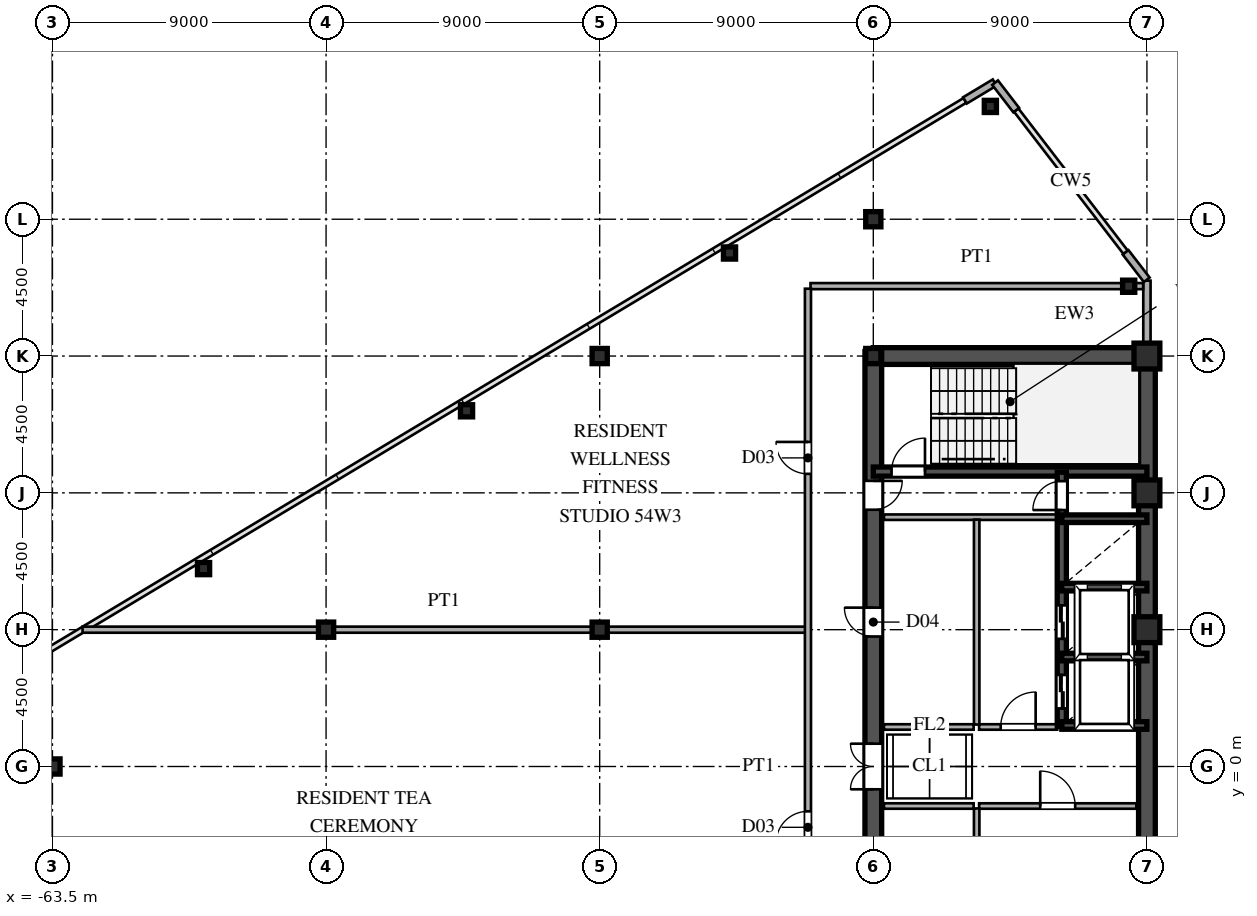
"""IFC4 building model, lengths in metres.
Left out: names, types, materials, properties, quantities, classifications, styles, units other than length and angle.
Written with IfcOpenShell. Run it as: python <this file> out.ifc"""

import sys

from ifc_helpers import new_model, si_unit, direction, frame, frame_2d, origin, origin_2d, place, context, subcontext, project, spatial, rectangle, hollow_rectangle, i_section, extrude, source, transform, mapped, element, fill, save


model = new_model("IFC4")
c1 = context("Model", 3, precision=1e-05, world=origin(), true_north=direction((0.0, 1.0)))
c2 = subcontext(c1, "Body", "Model", "MODEL_VIEW")
j1 = project(units=[si_unit("LENGTHUNIT", "METRE"), si_unit("PLANEANGLEUNIT", "RADIAN")], contexts=[c1])
p1 = place(None, origin())
s1 = spatial("IfcSite", under=j1, at=p1, CompositionType="ELEMENT")
p2 = place(p1, origin())
s2 = spatial("IfcBuilding", under=s1, at=p2, CompositionType="ELEMENT")
p3 = place(p2, frame((0.0, 0.0, 203.1)))
s3 = spatial("IfcBuildingStorey", under=s2, at=p3, CompositionType="ELEMENT", Elevation=203.1)
m1 = source(origin(), c2, "Body", "SweptSolid", [
    extrude(hollow_rectangle(XDim=0.85, YDim=0.85, WallThickness=0.036, at=origin_2d()), origin(), (0.0, 0.0, 1.0), 3.6),
])
for number, where, z_axis, x_axis in (
    (1, (-27.5, 4.5, 0.0), (0.0, 0.0, 1.0), (1.0, 0.0, 0.0)),
    (2, (-27.5, 9.0, 0.0), (0.0, 0.0, 1.0), (1.0, 0.0, 0.0)),
    (3, (-27.5, 13.5, 0.0), (0.0, 0.0, 1.0), (1.0, 0.0, 0.0)),
):
    element("IfcColumn", number, at=place(p3, frame(where, z_axis=z_axis, x_axis=x_axis)), inside=s3, PredefinedType="COLUMN", context=c2, shape_type="MappedRepresentation", body=[
        mapped(m1, transform((0.0, 0.0, 0.0), scale=1.0)),
    ])
m2 = source(origin(), c2, "Body", "SweptSolid", [
    extrude(i_section(OverallWidth=0.5, OverallDepth=0.5, WebThickness=0.02, FlangeThickness=0.032, at=origin_2d()), origin(), (0.0, 0.0, 1.0), 3.6),
])
for number, where, z_axis, x_axis in (
    (4, (-36.5, 13.5, 0.0), (0.0, 0.0, 1.0), (1.0, 0.0, 0.0)),
    (5, (-36.5, 18.0, 0.0), (0.0, 0.0, 1.0), (1.0, 0.0, 0.0)),
    (6, (-45.5, 4.5, 0.0), (0.0, 0.0, 1.0), (1.0, 0.0, 0.0)),
    (7, (-45.5, 13.5, 0.0), (0.0, 0.0, 1.0), (1.0, 0.0, 0.0)),
    (8, (-54.5, 4.5, 0.0), (0.0, 0.0, 1.0), (1.0, 0.0, 0.0)),
    (9, (-63.5, 0.0, 0.0), (0.0, 0.0, 1.0), (1.0, 0.0, 0.0)),
):
    element("IfcColumn", number, at=place(p3, frame(where, z_axis=z_axis, x_axis=x_axis)), inside=s3, PredefinedType="COLUMN", context=c2, shape_type="MappedRepresentation", body=[
        mapped(m2, transform((0.0, 0.0, 0.0), scale=1.0)),
    ])
m3 = source(origin(), c2, "Body", "SweptSolid", [
    extrude(hollow_rectangle(XDim=0.4, YDim=0.4, WallThickness=0.016, at=origin_2d()), origin(), (0.0, 0.0, 1.0), 3.6),
])
for number, where, z_axis, x_axis in (
    (10, (-28.1, 15.796, 0.0), (0.0, 0.0, 1.0), (1.0, 0.0, 0.0)),
    (11, (-32.65, 21.71, 0.0), (0.0, 0.0, 1.0), (1.0, 0.0, 0.0)),
    (12, (-41.23, 16.889, 0.0), (0.0, 0.0, 1.0), (1.0, 0.0, 0.0)),
    (13, (-49.88, 11.699, 0.0), (0.0, 0.0, 1.0), (1.0, 0.0, 0.0)),
    (14, (-58.53, 6.509, 0.0), (0.0, 0.0, 1.0), (1.0, 0.0, 0.0)),
):
    element("IfcColumn", number, at=place(p3, frame(where, z_axis=z_axis, x_axis=x_axis)), inside=s3, PredefinedType="COLUMN", context=c2, shape_type="MappedRepresentation", body=[
        mapped(m3, transform((0.0, 0.0, 0.0), scale=1.0)),
    ])
p4 = place(p3, frame((-27.5, 13.78, 0.0), z_axis=(0.0, 0.0, 1.0), x_axis=(0.0, 1.0, 0.0)))
e15 = element("IfcWall", 15, at=p4, inside=s3, PredefinedType="SOLIDWALL", context=c2, shape_type="SweptSolid", body=[
    extrude(rectangle(XDim=0.6, YDim=0.24, at=frame_2d((0.3, 0.0))), origin(), (0.0, 0.0, 1.0), 2.88),
])
p5 = place(p3, frame((-27.5, 14.38, 0.0), z_axis=(0.0, 0.0, 1.0), x_axis=(0.0, 1.0, 0.0)))
e16 = element("IfcWall", 16, at=p5, inside=s3, PredefinedType="SOLIDWALL", context=c2, shape_type="SweptSolid", body=[
    extrude(rectangle(XDim=1.6, YDim=0.24, at=frame_2d((0.8, 0.0))), origin(), (0.0, 0.0, 1.0), 3.38),
])
for number, where, z_axis, x_axis in (
    (17, (-27.506, 16.008, 0.0), (0.0, 0.0, 1.0), (-0.61, 0.793, 0.0)),
    (18, (-31.799, 21.588, 0.0), (0.0, 0.0, 1.0), (-0.61, 0.793, 0.0)),
    (19, (-32.509, 22.495, 0.0), (0.0, 0.0, 1.0), (-0.857, -0.515, 0.0)),
):
    element("IfcWall", number, at=place(p3, frame(where, z_axis=z_axis, x_axis=x_axis)), inside=s3, PredefinedType="SOLIDWALL", context=c2, shape_type="SweptSolid", body=[
        extrude(rectangle(XDim=1.14, YDim=0.24, at=frame_2d((0.57, 0.0))), origin(), (0.0, 0.0, 1.0), 3.38),
    ])
for number, where, z_axis, x_axis in (
    (20, (-27.5, -13.5, 0.0), (0.0, 0.0, 1.0), (0.0, 1.0, 0.0)),
    (21, (-27.5, 1.3, 0.0), (0.0, 0.0, 1.0), (0.0, 1.0, 0.0)),
):
    element("IfcWall", number, at=place(p3, frame(where, z_axis=z_axis, x_axis=x_axis)), inside=s3, PredefinedType="SHEAR", context=c2, shape_type="SweptSolid", body=[
        extrude(rectangle(XDim=12.2, YDim=0.55, at=frame_2d((6.1, 0.0))), origin(), (0.0, 0.0, 1.0), 3.38),
    ])
p6 = place(p3, frame((-27.5, -1.3, 0.0), z_axis=(0.0, 0.0, 1.0), x_axis=(0.0, 1.0, 0.0)))
e22 = element("IfcWall", 22, at=p6, inside=s3, PredefinedType="SHEAR", context=c2, shape_type="SweptSolid", body=[
    extrude(rectangle(XDim=2.6, YDim=0.55, at=frame_2d((1.3, 0.0))), origin(), (0.0, 0.0, 1.0), 3.38),
])
p7 = place(p3, frame((-36.5, 13.5, 0.0), z_axis=(0.0, 0.0, 1.0), x_axis=(1.0, 0.0, 0.0)))
e23 = element("IfcWall", 23, at=p7, inside=s3, PredefinedType="SHEAR", context=c2, shape_type="SweptSolid", body=[
    extrude(rectangle(XDim=9.0, YDim=0.55, at=frame_2d((4.5, 0.0))), origin(), (0.0, 0.0, 1.0), 3.38),
])
p8 = place(p3, frame((-36.5, -1.3, 0.0), z_axis=(0.0, 0.0, 1.0), x_axis=(0.0, 1.0, 0.0)))
e24 = element("IfcWall", 24, at=p8, inside=s3, PredefinedType="SHEAR", context=c2, shape_type="SweptSolid", body=[
    extrude(rectangle(XDim=2.6, YDim=0.55, at=frame_2d((1.3, 0.0))), origin(), (0.0, 0.0, 1.0), 3.38),
])
p9 = place(p8, frame((0.55, 0.0, 0.0)))
e25 = element("IfcOpeningElement", 25, at=p9, cuts=e24, PredefinedType="OPENING", context=c2, shape_type="SweptSolid", body=[
    extrude(rectangle(XDim=1.5, YDim=2.3, at=frame_2d((0.75, 1.15))), frame((0.0, 0.285, 0.0), z_axis=(0.0, -1.0, 0.0), x_axis=(1.0, 0.0, 0.0)), (0.0, 0.0, 1.0), 0.57),
])
p10 = place(p3, frame((-36.5, 8.2, 0.0), z_axis=(0.0, 0.0, 1.0), x_axis=(0.0, 1.0, 0.0)))
e26 = element("IfcWall", 26, at=p10, inside=s3, PredefinedType="SHEAR", context=c2, shape_type="SweptSolid", body=[
    extrude(rectangle(XDim=5.45, YDim=0.55, at=frame_2d((2.725, 0.0))), origin(), (0.0, 0.0, 1.0), 3.38),
])
p11 = place(p10, frame((0.245, 0.0, 0.0)))
e27 = element("IfcOpeningElement", 27, at=p11, cuts=e26, PredefinedType="OPENING", context=c2, shape_type="SweptSolid", body=[
    extrude(rectangle(XDim=0.95, YDim=2.15, at=frame_2d((0.475, 1.075))), frame((0.0, 0.285, 0.0), z_axis=(0.0, -1.0, 0.0), x_axis=(1.0, 0.0, 0.0)), (0.0, 0.0, 1.0), 0.57),
])
p12 = place(p3, frame((-36.5, -6.5, 0.0), z_axis=(0.0, 0.0, 1.0), x_axis=(0.0, 1.0, 0.0)))
e28 = element("IfcWall", 28, at=p12, inside=s3, PredefinedType="SHEAR", context=c2, shape_type="SweptSolid", body=[
    extrude(rectangle(XDim=5.2, YDim=0.55, at=frame_2d((2.6, 0.0))), origin(), (0.0, 0.0, 1.0), 3.38),
])
p13 = place(p12, frame((2.125, 0.0, 0.0)))
e29 = element("IfcOpeningElement", 29, at=p13, cuts=e28, PredefinedType="OPENING", context=c2, shape_type="SweptSolid", body=[
    extrude(rectangle(XDim=0.95, YDim=2.15, at=frame_2d((0.475, 1.075))), frame((0.0, 0.285, 0.0), z_axis=(0.0, -1.0, 0.0), x_axis=(1.0, 0.0, 0.0)), (0.0, 0.0, 1.0), 0.57),
])
p14 = place(p3, frame((-36.5, 1.3, 0.0), z_axis=(0.0, 0.0, 1.0), x_axis=(0.0, 1.0, 0.0)))
e30 = element("IfcWall", 30, at=p14, inside=s3, PredefinedType="SHEAR", context=c2, shape_type="SweptSolid", body=[
    extrude(rectangle(XDim=6.9, YDim=0.55, at=frame_2d((3.45, 0.0))), origin(), (0.0, 0.0, 1.0), 3.38),
])
p15 = place(p14, frame((2.975, 0.0, 0.0)))
e31 = element("IfcOpeningElement", 31, at=p15, cuts=e30, PredefinedType="OPENING", context=c2, shape_type="SweptSolid", body=[
    extrude(rectangle(XDim=0.95, YDim=2.15, at=frame_2d((0.475, 1.075))), frame((0.0, 0.285, 0.0), z_axis=(0.0, -1.0, 0.0), x_axis=(1.0, 0.0, 0.0)), (0.0, 0.0, 1.0), 0.57),
])
p16 = place(p3, frame((-36.5, 9.7, 0.0), z_axis=(0.0, 0.0, 1.0), x_axis=(1.0, 0.0, 0.0)))
e32 = element("IfcWall", 32, at=p16, inside=s3, PredefinedType="SHEAR", context=c2, shape_type="SweptSolid", body=[
    extrude(rectangle(XDim=9.0, YDim=0.3, at=frame_2d((4.5, 0.0))), origin(), (0.0, 0.0, 1.0), 3.38),
])
p17 = place(p16, frame((0.6, 0.0, 0.0)))
e33 = element("IfcOpeningElement", 33, at=p17, cuts=e32, PredefinedType="OPENING", context=c2, shape_type="SweptSolid", body=[
    extrude(rectangle(XDim=1.1, YDim=2.2, at=frame_2d((0.55, 1.1))), frame((0.0, 0.16, 0.0), z_axis=(0.0, -1.0, 0.0), x_axis=(1.0, 0.0, 0.0)), (0.0, 0.0, 1.0), 0.32),
])
for number, where, z_axis, x_axis in (
    (34, (-30.3, 1.35, 0.0), (0.0, 0.0, 1.0), (1.0, 0.0, 0.0)),
    (35, (-30.3, 3.6, 0.0), (0.0, 0.0, 1.0), (1.0, 0.0, 0.0)),
    (36, (-30.3, 5.9, 0.0), (0.0, 0.0, 1.0), (1.0, 0.0, 0.0)),
    (37, (-30.3, 8.15, 0.0), (0.0, 0.0, 1.0), (1.0, 0.0, 0.0)),
):
    element("IfcWall", number, at=place(p3, frame(where, z_axis=z_axis, x_axis=x_axis)), inside=s3, PredefinedType="SHEAR", context=c2, shape_type="SweptSolid", body=[
        extrude(rectangle(XDim=2.8, YDim=0.25, at=frame_2d((1.4, 0.0))), origin(), (0.0, 0.0, 1.0), 3.38),
    ])
p18 = place(p3, frame((-30.3, 1.32, 0.0), z_axis=(0.0, 0.0, 1.0), x_axis=(0.0, 1.0, 0.0)))
e38 = element("IfcWall", 38, at=p18, inside=s3, PredefinedType="SHEAR", context=c2, shape_type="SweptSolid", body=[
    extrude(rectangle(XDim=2.28, YDim=0.3, at=frame_2d((1.14, 0.0))), origin(), (0.0, 0.0, 1.0), 3.38),
])
p19 = place(p18, frame((0.59, 0.0, 0.0)))
e39 = element("IfcOpeningElement", 39, at=p19, cuts=e38, PredefinedType="OPENING", context=c2, shape_type="SweptSolid", body=[
    extrude(rectangle(XDim=1.1, YDim=2.2, at=frame_2d((0.55, 1.1))), frame((0.0, 0.16, 0.0), z_axis=(0.0, -1.0, 0.0), x_axis=(1.0, 0.0, 0.0)), (0.0, 0.0, 1.0), 0.32),
])
p20 = place(p3, frame((-30.3, 3.6, 0.0), z_axis=(0.0, 0.0, 1.0), x_axis=(0.0, 1.0, 0.0)))
e40 = element("IfcWall", 40, at=p20, inside=s3, PredefinedType="SHEAR", context=c2, shape_type="SweptSolid", body=[
    extrude(rectangle(XDim=2.3, YDim=0.3, at=frame_2d((1.15, 0.0))), origin(), (0.0, 0.0, 1.0), 3.38),
])
p21 = place(p20, frame((0.6, 0.0, 0.0)))
e41 = element("IfcOpeningElement", 41, at=p21, cuts=e40, PredefinedType="OPENING", context=c2, shape_type="SweptSolid", body=[
    extrude(rectangle(XDim=1.1, YDim=2.2, at=frame_2d((0.55, 1.1))), frame((0.0, 0.16, 0.0), z_axis=(0.0, -1.0, 0.0), x_axis=(1.0, 0.0, 0.0)), (0.0, 0.0, 1.0), 0.32),
])
p22 = place(p3, frame((-30.3, 5.9, 0.0), z_axis=(0.0, 0.0, 1.0), x_axis=(0.0, 1.0, 0.0)))
e42 = element("IfcWall", 42, at=p22, inside=s3, PredefinedType="SHEAR", context=c2, shape_type="SweptSolid", body=[
    extrude(rectangle(XDim=2.25, YDim=0.3, at=frame_2d((1.125, 0.0))), origin(), (0.0, 0.0, 1.0), 3.38),
])
p23 = place(p3, frame((-30.3, 8.15, 0.0), z_axis=(0.0, 0.0, 1.0), x_axis=(0.0, 1.0, 0.0)))
e43 = element("IfcWall", 43, at=p23, inside=s3, PredefinedType="SHEAR", context=c2, shape_type="SweptSolid", body=[
    extrude(rectangle(XDim=1.53, YDim=0.3, at=frame_2d((0.765, 0.0))), origin(), (0.0, 0.0, 1.0), 3.38),
])
p24 = place(p23, frame((0.285, 0.0, 0.0)))
e44 = element("IfcOpeningElement", 44, at=p24, cuts=e43, PredefinedType="OPENING", context=c2, shape_type="SweptSolid", body=[
    extrude(rectangle(XDim=0.95, YDim=2.15, at=frame_2d((0.475, 1.075))), frame((0.0, 0.16, 0.0), z_axis=(0.0, -1.0, 0.0), x_axis=(1.0, 0.0, 0.0)), (0.0, 0.0, 1.0), 0.32),
])
p25 = place(p3, frame((-36.15, 8.2, 0.0), z_axis=(0.0, 0.0, 1.0), x_axis=(1.0, 0.0, 0.0)))
e45 = element("IfcWall", 45, at=p25, inside=s3, PredefinedType="PARTITIONING", context=c2, shape_type="SweptSolid", body=[
    extrude(rectangle(XDim=5.7, YDim=0.18, at=frame_2d((2.85, 0.0))), origin(), (0.0, 0.0, 1.0), 3.38),
])
p26 = place(p3, frame((-33.1, -6.42, 0.0), z_axis=(0.0, 0.0, 1.0), x_axis=(0.0, 1.0, 0.0)))
e46 = element("IfcWall", 46, at=p26, inside=s3, PredefinedType="PARTITIONING", context=c2, shape_type="SweptSolid", body=[
    extrude(rectangle(XDim=5.04, YDim=0.18, at=frame_2d((2.52, 0.0))), origin(), (0.0, 0.0, 1.0), 3.38),
])
p27 = place(p3, frame((-33.1, 1.38, 0.0), z_axis=(0.0, 0.0, 1.0), x_axis=(0.0, 1.0, 0.0)))
e47 = element("IfcWall", 47, at=p27, inside=s3, PredefinedType="PARTITIONING", context=c2, shape_type="SweptSolid", body=[
    extrude(rectangle(XDim=6.74, YDim=0.18, at=frame_2d((3.37, 0.0))), origin(), (0.0, 0.0, 1.0), 3.38),
])
p28 = place(p3, frame((-33.02, -1.3, 0.0), z_axis=(0.0, 0.0, 1.0), x_axis=(1.0, 0.0, 0.0)))
e48 = element("IfcWall", 48, at=p28, inside=s3, PredefinedType="PARTITIONING", context=c2, shape_type="SweptSolid", body=[
    extrude(rectangle(XDim=5.17, YDim=0.18, at=frame_2d((2.585, 0.0))), origin(), (0.0, 0.0, 1.0), 3.38),
])
p29 = place(p28, frame((2.01, 0.0, 0.0)))
e49 = element("IfcOpeningElement", 49, at=p29, cuts=e48, PredefinedType="OPENING", context=c2, shape_type="SweptSolid", body=[
    extrude(rectangle(XDim=1.15, YDim=2.2, at=frame_2d((0.575, 1.1))), frame((0.0, 0.1, 0.0), z_axis=(0.0, -1.0, 0.0), x_axis=(1.0, 0.0, 0.0)), (0.0, 0.0, 1.0), 0.2),
])
p30 = place(p3, frame((-33.02, 1.3, 0.0), z_axis=(0.0, 0.0, 1.0), x_axis=(1.0, 0.0, 0.0)))
e50 = element("IfcWall", 50, at=p30, inside=s3, PredefinedType="PARTITIONING", context=c2, shape_type="SweptSolid", body=[
    extrude(rectangle(XDim=2.57, YDim=0.18, at=frame_2d((1.285, 0.0))), origin(), (0.0, 0.0, 1.0), 3.38),
])
p31 = place(p30, frame((0.71, 0.0, 0.0)))
e51 = element("IfcOpeningElement", 51, at=p31, cuts=e50, PredefinedType="OPENING", context=c2, shape_type="SweptSolid", body=[
    extrude(rectangle(XDim=1.15, YDim=2.2, at=frame_2d((0.575, 1.1))), frame((0.0, 0.1, 0.0), z_axis=(0.0, -1.0, 0.0), x_axis=(1.0, 0.0, 0.0)), (0.0, 0.0, 1.0), 0.2),
])
for number, where, z_axis, x_axis in (
    (52, (-36.15, -1.3, 0.0), (0.0, 0.0, 1.0), (1.0, 0.0, 0.0)),
    (53, (-36.15, 1.3, 0.0), (0.0, 0.0, 1.0), (1.0, 0.0, 0.0)),
):
    element("IfcWall", number, at=place(p3, frame(where, z_axis=z_axis, x_axis=x_axis)), inside=s3, PredefinedType="PARTITIONING", context=c2, shape_type="SweptSolid", body=[
        extrude(rectangle(XDim=2.95, YDim=0.18, at=frame_2d((1.475, 0.0))), origin(), (0.0, 0.0, 1.0), 3.38),
    ])
p32 = place(p3, frame((-62.51, 4.5, 0.0), z_axis=(0.0, 0.0, 1.0), x_axis=(1.0, 0.0, 0.0)))
e54 = element("IfcWall", 54, at=p32, inside=s3, PredefinedType="PARTITIONING", context=c2, shape_type="SweptSolid", body=[
    extrude(rectangle(XDim=7.99, YDim=0.2, at=frame_2d((3.995, 0.0))), origin(), (0.0, 0.0, 1.0), 3.38),
])
p33 = place(p3, frame((-54.52, 4.5, 0.0), z_axis=(0.0, 0.0, 1.0), x_axis=(1.0, 0.0, 0.0)))
e55 = element("IfcWall", 55, at=p33, inside=s3, PredefinedType="PARTITIONING", context=c2, shape_type="SweptSolid", body=[
    extrude(rectangle(XDim=15.79, YDim=0.2, at=frame_2d((7.895, 0.0))), origin(), (0.0, 0.0, 1.0), 2.78),
])
p34 = place(p3, frame((-38.565, 15.8, 0.0), z_axis=(0.0, 0.0, 1.0), x_axis=(1.0, 0.0, 0.0)))
e56 = element("IfcWall", 56, at=p34, inside=s3, PredefinedType="PARTITIONING", context=c2, shape_type="SweptSolid", body=[
    extrude(rectangle(XDim=10.94, YDim=0.2, at=frame_2d((5.47, 0.0))), origin(), (0.0, 0.0, 1.0), 3.38),
])
p35 = place(p3, frame((-38.65, -15.715, 0.0), z_axis=(0.0, 0.0, 1.0), x_axis=(0.0, 1.0, 0.0)))
e57 = element("IfcWall", 57, at=p35, inside=s3, PredefinedType="PARTITIONING", context=c2, shape_type="SweptSolid", body=[
    extrude(rectangle(XDim=31.43, YDim=0.2, at=frame_2d((15.715, 0.0))), origin(), (0.0, 0.0, 1.0), 3.38),
])
p36 = place(p35, frame((5.292, 0.0, 0.0)))
e58 = element("IfcOpeningElement", 58, at=p36, cuts=e57, PredefinedType="OPENING", context=c2, shape_type="SweptSolid", body=[
    extrude(rectangle(XDim=1.05, YDim=2.25, at=frame_2d((0.525, 1.125))), frame((0.0, 0.11, 0.0), z_axis=(0.0, -1.0, 0.0), x_axis=(1.0, 0.0, 0.0)), (0.0, 0.0, 1.0), 0.22),
])
p37 = place(p35, frame((13.19, 0.0, 0.0)))
e59 = element("IfcOpeningElement", 59, at=p37, cuts=e57, PredefinedType="OPENING", context=c2, shape_type="SweptSolid", body=[
    extrude(rectangle(XDim=1.05, YDim=2.25, at=frame_2d((0.525, 1.125))), frame((0.0, 0.11, 0.0), z_axis=(0.0, -1.0, 0.0), x_axis=(1.0, 0.0, 0.0)), (0.0, 0.0, 1.0), 0.22),
])
p38 = place(p35, frame((25.34, 0.0, 0.0)))
e60 = element("IfcOpeningElement", 60, at=p38, cuts=e57, PredefinedType="OPENING", context=c2, shape_type="SweptSolid", body=[
    extrude(rectangle(XDim=1.05, YDim=2.25, at=frame_2d((0.525, 1.125))), frame((0.0, 0.11, 0.0), z_axis=(0.0, -1.0, 0.0), x_axis=(1.0, 0.0, 0.0)), (0.0, 0.0, 1.0), 0.22),
])
m4 = source(origin(), c2, "Body", "SweptSolid", [
    extrude(rectangle(XDim=1.5, YDim=2.3, at=frame_2d((0.75, 1.15))), frame((0.0, 0.025, 0.0), z_axis=(0.0, -1.0, 0.0), x_axis=(1.0, 0.0, 0.0)), (0.0, 0.0, 1.0), 0.05),
])
p39 = place(p9, origin())
e61 = element("IfcDoor", 61, at=p39, inside=s3, OperationType="DOUBLE_SWING_LEFT", PredefinedType="DOOR", context=c2, shape_type="MappedRepresentation", body=[
    mapped(m4, transform((0.0, 0.0, 0.0), scale=1.0)),
])
fill(e25, e61)
m5 = source(origin(), c2, "Body", "SweptSolid", [
    extrude(rectangle(XDim=0.95, YDim=2.15, at=frame_2d((0.475, 1.075))), frame((0.0, 0.025, 0.0), z_axis=(0.0, -1.0, 0.0), x_axis=(1.0, 0.0, 0.0)), (0.0, 0.0, 1.0), 0.05),
])
p40 = place(p11, frame((0.95, 0.0, 0.0), z_axis=(0.0, 0.0, 1.0), x_axis=(-1.0, 0.0, 0.0)))
e62 = element("IfcDoor", 62, at=p40, inside=s3, OperationType="SINGLE_SWING_RIGHT", PredefinedType="DOOR", context=c2, shape_type="MappedRepresentation", body=[
    mapped(m5, transform((0.0, 0.0, 0.0), scale=1.0)),
])
fill(e27, e62)
p41 = place(p15, origin())
e63 = element("IfcDoor", 63, at=p41, inside=s3, OperationType="SINGLE_SWING_RIGHT", PredefinedType="DOOR", context=c2, shape_type="MappedRepresentation", body=[
    mapped(m5, transform((0.0, 0.0, 0.0), scale=1.0)),
])
fill(e31, e63)
m6 = source(origin(), c2, "Body", "SweptSolid", [
    extrude(rectangle(XDim=1.1, YDim=2.2, at=frame_2d((0.55, 1.1))), frame((0.0, 0.025, 0.0), z_axis=(0.0, -1.0, 0.0), x_axis=(1.0, 0.0, 0.0)), (0.0, 0.0, 1.0), 0.05),
])
p42 = place(p17, origin())
e64 = element("IfcDoor", 64, at=p42, inside=s3, OperationType="SINGLE_SWING_RIGHT", PredefinedType="DOOR", context=c2, shape_type="MappedRepresentation", body=[
    mapped(m6, transform((0.0, 0.0, 0.0), scale=1.0)),
])
fill(e33, e64)
m7 = source(origin(), c2, "Body", "SweptSolid", [
    extrude(rectangle(XDim=1.1, YDim=2.2, at=frame_2d((0.55, 1.1))), frame((0.0, 0.025, 0.0), z_axis=(0.0, -1.0, 0.0), x_axis=(1.0, 0.0, 0.0)), (0.0, 0.0, 1.0), 0.05),
])
p43 = place(p19, origin())
e65 = element("IfcDoor", 65, at=p43, inside=s3, OperationType="DOUBLE_DOOR_SLIDING", PredefinedType="DOOR", context=c2, shape_type="MappedRepresentation", body=[
    mapped(m7, transform((0.0, 0.0, 0.0), scale=1.0)),
])
fill(e39, e65)
p44 = place(p21, origin())
e66 = element("IfcDoor", 66, at=p44, inside=s3, OperationType="DOUBLE_DOOR_SLIDING", PredefinedType="DOOR", context=c2, shape_type="MappedRepresentation", body=[
    mapped(m7, transform((0.0, 0.0, 0.0), scale=1.0)),
])
fill(e41, e66)
p45 = place(p24, origin())
e67 = element("IfcDoor", 67, at=p45, inside=s3, OperationType="SINGLE_SWING_LEFT", PredefinedType="DOOR", context=c2, shape_type="MappedRepresentation", body=[
    mapped(m5, transform((0.0, 0.0, 0.0), scale=1.0)),
])
fill(e44, e67)
m8 = source(origin(), c2, "Body", "SweptSolid", [
    extrude(rectangle(XDim=1.15, YDim=2.2, at=frame_2d((0.575, 1.1))), frame((0.0, 0.025, 0.0), z_axis=(0.0, -1.0, 0.0), x_axis=(1.0, 0.0, 0.0)), (0.0, 0.0, 1.0), 0.05),
])
p46 = place(p29, origin())
e68 = element("IfcDoor", 68, at=p46, inside=s3, OperationType="SINGLE_SWING_LEFT", PredefinedType="DOOR", context=c2, shape_type="MappedRepresentation", body=[
    mapped(m8, transform((0.0, 0.0, 0.0), scale=1.0)),
])
fill(e49, e68)
p47 = place(p31, origin())
e69 = element("IfcDoor", 69, at=p47, inside=s3, OperationType="SINGLE_SWING_RIGHT", PredefinedType="DOOR", context=c2, shape_type="MappedRepresentation", body=[
    mapped(m8, transform((0.0, 0.0, 0.0), scale=1.0)),
])
fill(e51, e69)
m9 = source(origin(), c2, "Body", "SweptSolid", [
    extrude(rectangle(XDim=1.05, YDim=2.25, at=frame_2d((0.525, 1.125))), frame((0.0, 0.025, 0.0), z_axis=(0.0, -1.0, 0.0), x_axis=(1.0, 0.0, 0.0)), (0.0, 0.0, 1.0), 0.05),
])
p48 = place(p37, origin())
e70 = element("IfcDoor", 70, at=p48, inside=s3, OperationType="SINGLE_SWING_LEFT", PredefinedType="DOOR", context=c2, shape_type="MappedRepresentation", body=[
    mapped(m9, transform((0.0, 0.0, 0.0), scale=1.0)),
])
fill(e59, e70)
p49 = place(p38, origin())
e71 = element("IfcDoor", 71, at=p49, inside=s3, OperationType="SINGLE_SWING_RIGHT", PredefinedType="DOOR", context=c2, shape_type="MappedRepresentation", body=[
    mapped(m9, transform((0.0, 0.0, 0.0), scale=1.0)),
])
fill(e60, e71)
save(model, sys.argv[1])
